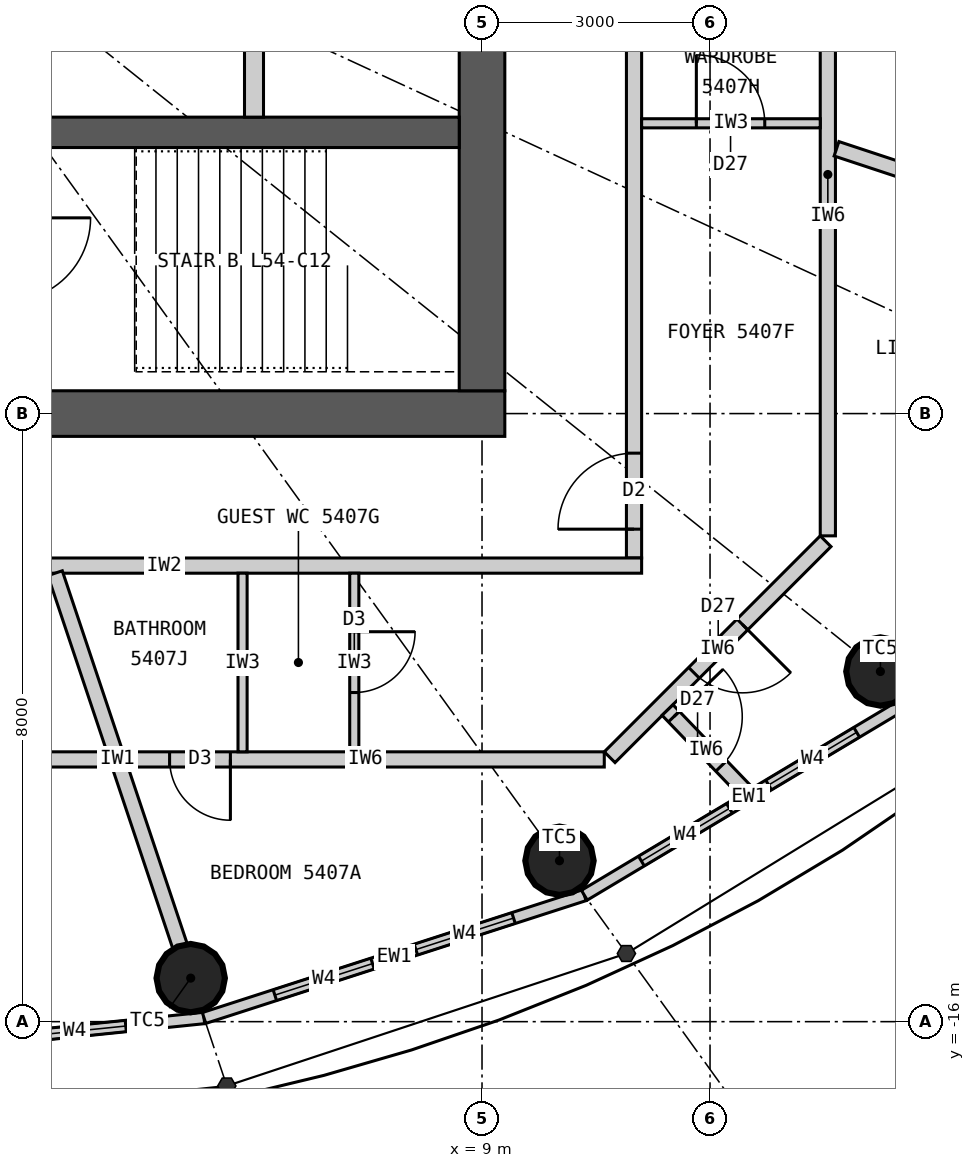
"""IFC4 building model, lengths in metres.
Left out: names, types, materials, properties, quantities, classifications, styles, units other than length and angle.
Written with IfcOpenShell. Run it as: python <this file> out.ifc"""

import sys

from ifc_helpers import new_model, si_unit, direction, frame, frame_2d, origin, origin_2d, place, context, subcontext, project, spatial, rectangle, circle, extrude, element, fill, save


model = new_model("IFC4")
c1 = context("Model", 3, precision=1e-05, world=origin(), true_north=direction((0.0, 1.0)))
c2 = subcontext(c1, "Body", "Model", "MODEL_VIEW")
j1 = project(units=[si_unit("LENGTHUNIT", "METRE"), si_unit("PLANEANGLEUNIT", "RADIAN")], contexts=[c1])
p1 = place(None, origin())
s1 = spatial("IfcSite", under=j1, at=p1, CompositionType="ELEMENT")
p2 = place(p1, origin())
s2 = spatial("IfcBuilding", under=s1, at=p2, CompositionType="ELEMENT")
p3 = place(p2, frame((0.0, 0.0, 202.8)))
s3 = spatial("IfcBuildingStorey", under=s2, at=p3, CompositionType="ELEMENT", Elevation=202.8)
for number, where, z_axis, x_axis in (
    (1, (5.167, -15.427, 0.0), (0.0, 0.0, 1.0), (1.0, 0.0, 0.0)),
    (2, (10.019, -13.883, 0.0), (0.0, 0.0, 1.0), (1.0, 0.0, 0.0)),
    (3, (14.241, -11.393, 0.0), (0.0, 0.0, 1.0), (1.0, 0.0, 0.0)),
):
    element("IfcColumn", number, at=place(p3, frame(where, z_axis=z_axis, x_axis=x_axis)), inside=s3, PredefinedType="COLUMN", context=c2, shape_type="SweptSolid", body=[
        extrude(circle(Radius=0.45, at=origin_2d()), origin(), (0.0, 0.0, 1.0), 3.3),
    ])
p4 = place(p3, frame((9.3, -8.0, 0.0), z_axis=(0.0, 0.0, 1.0), x_axis=(-1.0, 0.0, 0.0)))
e4 = element("IfcWall", 4, at=p4, inside=s3, PredefinedType="SHEAR", context=c2, shape_type="SweptSolid", body=[
    extrude(rectangle(XDim=18.6, YDim=0.6, at=frame_2d((9.3, 0.0))), origin(), (0.0, 0.0, 1.0), 3.3),
])
p5 = place(p4, frame((8.0, 0.0, 0.0)))
e5 = element("IfcOpeningElement", 5, at=p5, cuts=e4, PredefinedType="OPENING", context=c2, shape_type="SweptSolid", body=[
    extrude(rectangle(XDim=1.2, YDim=2.2, at=frame_2d((0.6, 1.1))), frame((0.0, 0.31, 0.0), z_axis=(0.0, -1.0, 0.0), x_axis=(1.0, 0.0, 0.0)), (0.0, 0.0, 1.0), 0.62),
])
p6 = place(p4, frame((15.6, 0.0, 0.0)))
e6 = element("IfcOpeningElement", 6, at=p6, cuts=e4, PredefinedType="OPENING", context=c2, shape_type="SweptSolid", body=[
    extrude(rectangle(XDim=0.9, YDim=2.2, at=frame_2d((0.45, 1.1))), frame((0.0, 0.31, 0.0), z_axis=(0.0, -1.0, 0.0), x_axis=(1.0, 0.0, 0.0)), (0.0, 0.0, 1.0), 0.62),
])
p7 = place(p3, frame((9.0, -7.7, 0.0), z_axis=(0.0, 0.0, 1.0), x_axis=(0.0, 1.0, 0.0)))
e7 = element("IfcWall", 7, at=p7, inside=s3, PredefinedType="SHEAR", context=c2, shape_type="SweptSolid", body=[
    extrude(rectangle(XDim=15.4, YDim=0.6, at=frame_2d((7.7, 0.0))), origin(), (0.0, 0.0, 1.0), 3.3),
])
p8 = place(p7, frame((6.8, 0.0, 0.0)))
e8 = element("IfcOpeningElement", 8, at=p8, cuts=e7, PredefinedType="OPENING", context=c2, shape_type="SweptSolid", body=[
    extrude(rectangle(XDim=1.8, YDim=2.2, at=frame_2d((0.9, 1.1))), frame((0.0, 0.31, 0.0), z_axis=(0.0, -1.0, 0.0), x_axis=(1.0, 0.0, 0.0)), (0.0, 0.0, 1.0), 0.62),
])
p9 = place(p3, frame((-8.7, -4.3, 0.0), z_axis=(0.0, 0.0, 1.0), x_axis=(1.0, 0.0, 0.0)))
e9 = element("IfcWall", 9, at=p9, inside=s3, PredefinedType="SHEAR", context=c2, shape_type="SweptSolid", body=[
    extrude(rectangle(XDim=17.4, YDim=0.4, at=frame_2d((8.7, 0.0))), origin(), (0.0, 0.0, 1.0), 3.3),
])
p10 = place(p3, frame((6.0, -4.1, 0.0), z_axis=(0.0, 0.0, 1.0), x_axis=(0.0, 1.0, 0.0)))
e10 = element("IfcWall", 10, at=p10, inside=s3, PredefinedType="PARTITIONING", context=c2, shape_type="SweptSolid", body=[
    extrude(rectangle(XDim=2.35, YDim=0.25, at=frame_2d((1.175, 0.0))), origin(), (0.0, 0.0, 1.0), 3.3),
])
p11 = place(p3, frame((0.0, -16.5, 0.0), z_axis=(0.0, 0.0, 1.0), x_axis=(0.994774574972, 0.102095763818, 0.0)))
e11 = element("IfcWall", 11, at=p11, inside=s3, PredefinedType="ELEMENTEDWALL", context=c2, shape_type="SweptSolid", body=[
    extrude(rectangle(XDim=5.371, YDim=0.15, at=frame_2d((2.686, 0.0))), origin(), (0.0, 0.0, 1.0), 3.12),
])
p12 = place(p11, frame((1.035, 0.0, 0.9)))
e12 = element("IfcOpeningElement", 12, at=p12, cuts=e11, PredefinedType="OPENING", context=c2, shape_type="SweptSolid", body=[
    extrude(rectangle(XDim=1.35, YDim=1.9, at=frame_2d((0.675, 0.95))), frame((0.0, 0.085, 0.0), z_axis=(0.0, -1.0, 0.0), x_axis=(1.0, 0.0, 0.0)), (0.0, 0.0, 1.0), 0.17),
])
p13 = place(p11, frame((2.985, 0.0, 0.9)))
e13 = element("IfcOpeningElement", 13, at=p13, cuts=e11, PredefinedType="OPENING", context=c2, shape_type="SweptSolid", body=[
    extrude(rectangle(XDim=1.35, YDim=1.9, at=frame_2d((0.675, 0.95))), frame((0.0, 0.085, 0.0), z_axis=(0.0, -1.0, 0.0), x_axis=(1.0, 0.0, 0.0)), (0.0, 0.0, 1.0), 0.17),
])
p14 = place(p3, frame((5.343, -15.952, 0.0), z_axis=(0.0, 0.0, 1.0), x_axis=(0.951644702515, 0.307200846638, 0.0)))
e14 = element("IfcWall", 14, at=p14, inside=s3, PredefinedType="ELEMENTEDWALL", context=c2, shape_type="SweptSolid", body=[
    extrude(rectangle(XDim=5.258, YDim=0.15, at=frame_2d((2.629, 0.0))), origin(), (0.0, 0.0, 1.0), 3.12),
])
p15 = place(p14, frame((0.979, 0.0, 0.9)))
e15 = element("IfcOpeningElement", 15, at=p15, cuts=e14, PredefinedType="OPENING", context=c2, shape_type="SweptSolid", body=[
    extrude(rectangle(XDim=1.35, YDim=1.9, at=frame_2d((0.675, 0.95))), frame((0.0, 0.085, 0.0), z_axis=(0.0, -1.0, 0.0), x_axis=(1.0, 0.0, 0.0)), (0.0, 0.0, 1.0), 0.17),
])
p16 = place(p14, frame((2.929, 0.0, 0.9)))
e16 = element("IfcOpeningElement", 16, at=p16, cuts=e14, PredefinedType="OPENING", context=c2, shape_type="SweptSolid", body=[
    extrude(rectangle(XDim=1.35, YDim=1.9, at=frame_2d((0.675, 0.95))), frame((0.0, 0.085, 0.0), z_axis=(0.0, -1.0, 0.0), x_axis=(1.0, 0.0, 0.0)), (0.0, 0.0, 1.0), 0.17),
])
p17 = place(p3, frame((10.346, -14.336, 0.0), z_axis=(0.0, 0.0, 1.0), x_axis=(0.85822150553, 0.513279502265, 0.0)))
e17 = element("IfcWall", 17, at=p17, inside=s3, PredefinedType="ELEMENTEDWALL", context=c2, shape_type="SweptSolid", body=[
    extrude(rectangle(XDim=5.05, YDim=0.15, at=frame_2d((2.525, 0.0))), origin(), (0.0, 0.0, 1.0), 3.12),
])
p18 = place(p17, frame((0.875, 0.0, 0.9)))
e18 = element("IfcOpeningElement", 18, at=p18, cuts=e17, PredefinedType="OPENING", context=c2, shape_type="SweptSolid", body=[
    extrude(rectangle(XDim=1.35, YDim=1.9, at=frame_2d((0.675, 0.95))), frame((0.0, 0.085, 0.0), z_axis=(0.0, -1.0, 0.0), x_axis=(1.0, 0.0, 0.0)), (0.0, 0.0, 1.0), 0.17),
])
p19 = place(p17, frame((2.825, 0.0, 0.9)))
e19 = element("IfcOpeningElement", 19, at=p19, cuts=e17, PredefinedType="OPENING", context=c2, shape_type="SweptSolid", body=[
    extrude(rectangle(XDim=1.35, YDim=1.9, at=frame_2d((0.675, 0.95))), frame((0.0, 0.085, 0.0), z_axis=(0.0, -1.0, 0.0), x_axis=(1.0, 0.0, 0.0)), (0.0, 0.0, 1.0), 0.17),
])
p20 = place(p3, frame((11.0, -9.9, 0.0), z_axis=(0.0, 0.0, 1.0), x_axis=(0.0, 1.0, 0.0)))
e20 = element("IfcWall", 20, at=p20, inside=s3, PredefinedType="PARTITIONING", context=c2, shape_type="SweptSolid", body=[
    extrude(rectangle(XDim=19.8, YDim=0.2, at=frame_2d((9.9, 0.0))), origin(), (0.0, 0.0, 1.0), 3.12),
])
p21 = place(p20, frame((10.32, 0.0, 0.0)))
e21 = element("IfcOpeningElement", 21, at=p21, cuts=e20, PredefinedType="OPENING", context=c2, shape_type="SweptSolid", body=[
    extrude(rectangle(XDim=1.0, YDim=2.2, at=frame_2d((0.5, 1.1))), frame((0.0, 0.11, 0.0), z_axis=(0.0, -1.0, 0.0), x_axis=(1.0, 0.0, 0.0)), (0.0, 0.0, 1.0), 0.22),
])
p22 = place(p20, frame((18.653, 0.0, 0.0)))
e22 = element("IfcOpeningElement", 22, at=p22, cuts=e20, PredefinedType="OPENING", context=c2, shape_type="SweptSolid", body=[
    extrude(rectangle(XDim=1.0, YDim=2.2, at=frame_2d((0.5, 1.1))), frame((0.0, 0.11, 0.0), z_axis=(0.0, -1.0, 0.0), x_axis=(1.0, 0.0, 0.0)), (0.0, 0.0, 1.0), 0.22),
])
p23 = place(p20, frame((0.379, 0.0, 0.0)))
e23 = element("IfcOpeningElement", 23, at=p23, cuts=e20, PredefinedType="OPENING", context=c2, shape_type="SweptSolid", body=[
    extrude(rectangle(XDim=1.0, YDim=2.2, at=frame_2d((0.5, 1.1))), frame((0.0, 0.11, 0.0), z_axis=(0.0, -1.0, 0.0), x_axis=(1.0, 0.0, 0.0)), (0.0, 0.0, 1.0), 0.22),
])
p24 = place(p3, frame((11.1, -10.0, 0.0), z_axis=(0.0, 0.0, 1.0), x_axis=(-1.0, 0.0, 0.0)))
e24 = element("IfcWall", 24, at=p24, inside=s3, PredefinedType="PARTITIONING", context=c2, shape_type="SweptSolid", body=[
    extrude(rectangle(XDim=12.559, YDim=0.2, at=frame_2d((6.28, 0.0))), origin(), (0.0, 0.0, 1.0), 3.12),
])
p25 = place(p3, frame((3.383, -10.1, 0.0), z_axis=(0.0, 0.0, 1.0), x_axis=(0.317602151035, -0.948224063003, 0.0)))
e25 = element("IfcWall", 25, at=p25, inside=s3, PredefinedType="PARTITIONING", context=c2, shape_type="SweptSolid", body=[
    extrude(rectangle(XDim=5.168, YDim=0.2, at=frame_2d((2.584, 0.0))), origin(), (0.0, 0.0, 1.0), 2.42),
])
p26 = place(p3, frame((-6.364, -12.55, 0.0), z_axis=(0.0, 0.0, 1.0), x_axis=(1.0, 0.0, 0.0)))
e26 = element("IfcWall", 26, at=p26, inside=s3, PredefinedType="PARTITIONING", context=c2, shape_type="SweptSolid", body=[
    extrude(rectangle(XDim=10.446, YDim=0.2, at=frame_2d((5.223, 0.0))), origin(), (0.0, 0.0, 1.0), 3.12),
])
p27 = place(p26, frame((7.202, 0.0, 0.0)))
e27 = element("IfcOpeningElement", 27, at=p27, cuts=e26, PredefinedType="OPENING", context=c2, shape_type="SweptSolid", body=[
    extrude(rectangle(XDim=0.8, YDim=2.1, at=frame_2d((0.4, 1.05))), frame((0.0, 0.11, 0.0), z_axis=(0.0, -1.0, 0.0), x_axis=(1.0, 0.0, 0.0)), (0.0, 0.0, 1.0), 0.22),
])
p28 = place(p26, frame((3.895, 0.0, 0.0)))
e28 = element("IfcOpeningElement", 28, at=p28, cuts=e26, PredefinedType="OPENING", context=c2, shape_type="SweptSolid", body=[
    extrude(rectangle(XDim=0.9, YDim=2.1, at=frame_2d((0.45, 1.05))), frame((0.0, 0.11, 0.0), z_axis=(0.0, -1.0, 0.0), x_axis=(1.0, 0.0, 0.0)), (0.0, 0.0, 1.0), 0.22),
])
p29 = place(p3, frame((4.325, -12.55, 0.0), z_axis=(0.0, 0.0, 1.0), x_axis=(1.0, 0.0, 0.0)))
e29 = element("IfcWall", 29, at=p29, inside=s3, PredefinedType="PARTITIONING", context=c2, shape_type="SweptSolid", body=[
    extrude(rectangle(XDim=6.284, YDim=0.2, at=frame_2d((3.142, 0.0))), origin(), (0.0, 0.0, 1.0), 3.12),
])
p30 = place(p29, frame((0.564, 0.0, 0.0)))
e30 = element("IfcOpeningElement", 30, at=p30, cuts=e29, PredefinedType="OPENING", context=c2, shape_type="SweptSolid", body=[
    extrude(rectangle(XDim=0.8, YDim=2.1, at=frame_2d((0.4, 1.05))), frame((0.0, 0.11, 0.0), z_axis=(0.0, -1.0, 0.0), x_axis=(1.0, 0.0, 0.0)), (0.0, 0.0, 1.0), 0.22),
])
p31 = place(p3, frame((10.679, -12.521, 0.0), z_axis=(0.0, 0.0, 1.0), x_axis=(0.707106781187, 0.707106781187, 0.0)))
e31 = element("IfcWall", 31, at=p31, inside=s3, PredefinedType="PARTITIONING", context=c2, shape_type="SweptSolid", body=[
    extrude(rectangle(XDim=4.019, YDim=0.2, at=frame_2d((2.009, 0.0))), origin(), (0.0, 0.0, 1.0), 3.12),
])
p32 = place(p31, frame((1.57, 0.0, 0.0)))
e32 = element("IfcOpeningElement", 32, at=p32, cuts=e31, PredefinedType="OPENING", context=c2, shape_type="SweptSolid", body=[
    extrude(rectangle(XDim=0.9, YDim=2.1, at=frame_2d((0.45, 1.05))), frame((0.0, 0.11, 0.0), z_axis=(0.0, -1.0, 0.0), x_axis=(1.0, 0.0, 0.0)), (0.0, 0.0, 1.0), 0.22),
])
p33 = place(p3, frame((13.55, -9.609, 0.0), z_axis=(0.0, 0.0, 1.0), x_axis=(0.0, 1.0, 0.0)))
e33 = element("IfcWall", 33, at=p33, inside=s3, PredefinedType="PARTITIONING", context=c2, shape_type="SweptSolid", body=[
    extrude(rectangle(XDim=9.508, YDim=0.2, at=frame_2d((4.754, 0.0))), origin(), (0.0, 0.0, 1.0), 3.12),
])
p34 = place(p33, frame((7.308, 0.0, 0.0)))
e34 = element("IfcOpeningElement", 34, at=p34, cuts=e33, PredefinedType="OPENING", context=c2, shape_type="SweptSolid", body=[
    extrude(rectangle(XDim=0.8, YDim=2.1, at=frame_2d((0.4, 1.05))), frame((0.0, 0.11, 0.0), z_axis=(0.0, -1.0, 0.0), x_axis=(1.0, 0.0, 0.0)), (0.0, 0.0, 1.0), 0.22),
])
p35 = place(p3, frame((11.441, -11.9, 0.0), z_axis=(0.0, 0.0, 1.0), x_axis=(0.692958717259, -0.720977264672, 0.0)))
e35 = element("IfcWall", 35, at=p35, inside=s3, PredefinedType="PARTITIONING", context=c2, shape_type="SweptSolid", body=[
    extrude(rectangle(XDim=1.464, YDim=0.2, at=frame_2d((0.732, 0.0))), origin(), (0.0, 0.0, 1.0), 3.12),
])
p36 = place(p35, frame((0.12, 0.0, 0.0)))
e36 = element("IfcOpeningElement", 36, at=p36, cuts=e35, PredefinedType="OPENING", context=c2, shape_type="SweptSolid", body=[
    extrude(rectangle(XDim=0.9, YDim=2.1, at=frame_2d((0.45, 1.05))), frame((0.0, 0.11, 0.0), z_axis=(0.0, -1.0, 0.0), x_axis=(1.0, 0.0, 0.0)), (0.0, 0.0, 1.0), 0.22),
])
p37 = place(p3, frame((13.664, -4.516, 0.0), z_axis=(0.0, 0.0, 1.0), x_axis=(0.949481375941, -0.313823384632, 0.0)))
e37 = element("IfcWall", 37, at=p37, inside=s3, PredefinedType="PARTITIONING", context=c2, shape_type="SweptSolid", body=[
    extrude(rectangle(XDim=5.638, YDim=0.2, at=frame_2d((2.819, 0.0))), origin(), (0.0, 0.0, 1.0), 3.12),
])
p38 = place(p37, frame((1.82, 0.0, 0.0)))
e38 = element("IfcOpeningElement", 38, at=p38, cuts=e37, PredefinedType="OPENING", context=c2, shape_type="SweptSolid", body=[
    extrude(rectangle(XDim=0.9, YDim=2.1, at=frame_2d((0.45, 1.05))), frame((0.0, 0.11, 0.0), z_axis=(0.0, -1.0, 0.0), x_axis=(1.0, 0.0, 0.0)), (0.0, 0.0, 1.0), 0.22),
])
p39 = place(p3, frame((5.849, -10.1, 0.0), z_axis=(0.0, 0.0, 1.0), x_axis=(0.0, -1.0, 0.0)))
e39 = element("IfcWall", 39, at=p39, inside=s3, PredefinedType="PARTITIONING", context=c2, shape_type="SweptSolid", body=[
    extrude(rectangle(XDim=2.35, YDim=0.12, at=frame_2d((1.175, 0.0))), origin(), (0.0, 0.0, 1.0), 3.12),
])
p40 = place(p3, frame((7.319, -10.1, 0.0), z_axis=(0.0, 0.0, 1.0), x_axis=(0.0, -1.0, 0.0)))
e40 = element("IfcWall", 40, at=p40, inside=s3, PredefinedType="PARTITIONING", context=c2, shape_type="SweptSolid", body=[
    extrude(rectangle(XDim=2.35, YDim=0.12, at=frame_2d((1.175, 0.0))), origin(), (0.0, 0.0, 1.0), 3.12),
])
p41 = place(p40, frame((0.77, 0.0, 0.0)))
e41 = element("IfcOpeningElement", 41, at=p41, cuts=e40, PredefinedType="OPENING", context=c2, shape_type="SweptSolid", body=[
    extrude(rectangle(XDim=0.8, YDim=2.1, at=frame_2d((0.4, 1.05))), frame((0.0, 0.07, 0.0), z_axis=(0.0, -1.0, 0.0), x_axis=(1.0, 0.0, 0.0)), (0.0, 0.0, 1.0), 0.14),
])
p42 = place(p3, frame((11.1, -4.181, 0.0), z_axis=(0.0, 0.0, 1.0), x_axis=(1.0, 0.0, 0.0)))
e42 = element("IfcWall", 42, at=p42, inside=s3, PredefinedType="PARTITIONING", context=c2, shape_type="SweptSolid", body=[
    extrude(rectangle(XDim=2.35, YDim=0.12, at=frame_2d((1.175, 0.0))), origin(), (0.0, 0.0, 1.0), 3.12),
])
p43 = place(p42, frame((0.72, 0.0, 0.0)))
e43 = element("IfcOpeningElement", 43, at=p43, cuts=e42, PredefinedType="OPENING", context=c2, shape_type="SweptSolid", body=[
    extrude(rectangle(XDim=0.9, YDim=2.1, at=frame_2d((0.45, 1.05))), frame((0.0, 0.07, 0.0), z_axis=(0.0, -1.0, 0.0), x_axis=(1.0, 0.0, 0.0)), (0.0, 0.0, 1.0), 0.14),
])
p44 = place(p13, origin())
e44 = element("IfcWindow", 44, at=p44, inside=s3, PartitioningType="SINGLE_PANEL", PredefinedType="WINDOW", context=c2, shape_type="SweptSolid", body=[
    extrude(rectangle(XDim=1.35, YDim=1.9, at=frame_2d((0.675, 0.95))), frame((0.0, 0.03, 0.0), z_axis=(0.0, -1.0, 0.0), x_axis=(1.0, 0.0, 0.0)), (0.0, 0.0, 1.0), 0.06),
])
fill(e13, e44)
p45 = place(p15, origin())
e45 = element("IfcWindow", 45, at=p45, inside=s3, PartitioningType="SINGLE_PANEL", PredefinedType="WINDOW", context=c2, shape_type="SweptSolid", body=[
    extrude(rectangle(XDim=1.35, YDim=1.9, at=frame_2d((0.675, 0.95))), frame((0.0, 0.03, 0.0), z_axis=(0.0, -1.0, 0.0), x_axis=(1.0, 0.0, 0.0)), (0.0, 0.0, 1.0), 0.06),
])
fill(e15, e45)
p46 = place(p16, origin())
e46 = element("IfcWindow", 46, at=p46, inside=s3, PartitioningType="SINGLE_PANEL", PredefinedType="WINDOW", context=c2, shape_type="SweptSolid", body=[
    extrude(rectangle(XDim=1.35, YDim=1.9, at=frame_2d((0.675, 0.95))), frame((0.0, 0.03, 0.0), z_axis=(0.0, -1.0, 0.0), x_axis=(1.0, 0.0, 0.0)), (0.0, 0.0, 1.0), 0.06),
])
fill(e16, e46)
p47 = place(p18, origin())
e47 = element("IfcWindow", 47, at=p47, inside=s3, PartitioningType="SINGLE_PANEL", PredefinedType="WINDOW", context=c2, shape_type="SweptSolid", body=[
    extrude(rectangle(XDim=1.35, YDim=1.9, at=frame_2d((0.675, 0.95))), frame((0.0, 0.03, 0.0), z_axis=(0.0, -1.0, 0.0), x_axis=(1.0, 0.0, 0.0)), (0.0, 0.0, 1.0), 0.06),
])
fill(e18, e47)
p48 = place(p19, origin())
e48 = element("IfcWindow", 48, at=p48, inside=s3, PartitioningType="SINGLE_PANEL", PredefinedType="WINDOW", context=c2, shape_type="SweptSolid", body=[
    extrude(rectangle(XDim=1.35, YDim=1.9, at=frame_2d((0.675, 0.95))), frame((0.0, 0.03, 0.0), z_axis=(0.0, -1.0, 0.0), x_axis=(1.0, 0.0, 0.0)), (0.0, 0.0, 1.0), 0.06),
])
fill(e19, e48)
p49 = place(p23, origin())
e49 = element("IfcDoor", 49, at=p49, inside=s3, OperationType="SINGLE_SWING_LEFT", PredefinedType="DOOR", context=c2, shape_type="SweptSolid", body=[
    extrude(rectangle(XDim=1.0, YDim=2.2, at=frame_2d((0.5, 1.1))), frame((0.0, 0.025, 0.0), z_axis=(0.0, -1.0, 0.0), x_axis=(1.0, 0.0, 0.0)), (0.0, 0.0, 1.0), 0.05),
])
fill(e23, e49)
p50 = place(p30, origin())
e50 = element("IfcDoor", 50, at=p50, inside=s3, OperationType="SINGLE_SWING_RIGHT", PredefinedType="DOOR", context=c2, shape_type="SweptSolid", body=[
    extrude(rectangle(XDim=0.8, YDim=2.1, at=frame_2d((0.4, 1.05))), frame((0.0, 0.025, 0.0), z_axis=(0.0, -1.0, 0.0), x_axis=(1.0, 0.0, 0.0)), (0.0, 0.0, 1.0), 0.05),
])
fill(e30, e50)
p51 = place(p41, origin())
e51 = element("IfcDoor", 51, at=p51, inside=s3, OperationType="SINGLE_SWING_LEFT", PredefinedType="DOOR", context=c2, shape_type="SweptSolid", body=[
    extrude(rectangle(XDim=0.8, YDim=2.1, at=frame_2d((0.4, 1.05))), frame((0.0, 0.025, 0.0), z_axis=(0.0, -1.0, 0.0), x_axis=(1.0, 0.0, 0.0)), (0.0, 0.0, 1.0), 0.05),
])
fill(e41, e51)
p52 = place(p43, origin())
e52 = element("IfcDoor", 52, at=p52, inside=s3, OperationType="SINGLE_SWING_LEFT", PredefinedType="DOOR", context=c2, shape_type="SweptSolid", body=[
    extrude(rectangle(XDim=0.9, YDim=2.1, at=frame_2d((0.45, 1.05))), frame((0.0, 0.025, 0.0), z_axis=(0.0, -1.0, 0.0), x_axis=(1.0, 0.0, 0.0)), (0.0, 0.0, 1.0), 0.05),
])
fill(e43, e52)
p53 = place(p32, origin())
e53 = element("IfcDoor", 53, at=p53, inside=s3, OperationType="SINGLE_SWING_RIGHT", PredefinedType="DOOR", context=c2, shape_type="SweptSolid", body=[
    extrude(rectangle(XDim=0.9, YDim=2.1, at=frame_2d((0.45, 1.05))), frame((0.0, 0.025, 0.0), z_axis=(0.0, -1.0, 0.0), x_axis=(1.0, 0.0, 0.0)), (0.0, 0.0, 1.0), 0.05),
])
fill(e32, e53)
p54 = place(p36, origin())
e54 = element("IfcDoor", 54, at=p54, inside=s3, OperationType="SINGLE_SWING_LEFT", PredefinedType="DOOR", context=c2, shape_type="SweptSolid", body=[
    extrude(rectangle(XDim=0.9, YDim=2.1, at=frame_2d((0.45, 1.05))), frame((0.0, 0.025, 0.0), z_axis=(0.0, -1.0, 0.0), x_axis=(1.0, 0.0, 0.0)), (0.0, 0.0, 1.0), 0.05),
])
fill(e36, e54)
save(model, sys.argv[1])
